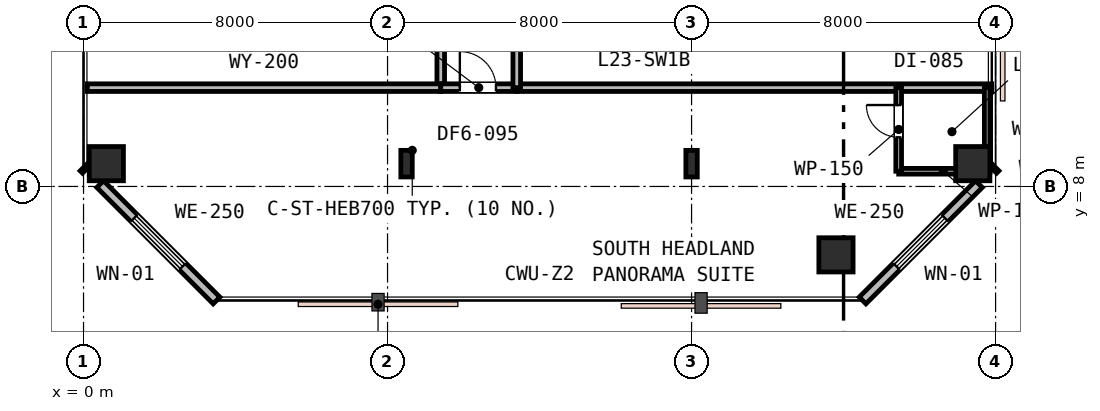
"""IFC4 building model, lengths in metres.
Left out: names, types, materials, properties, quantities, classifications, styles, units other than length and angle.
Written with IfcOpenShell. Run it as: python <this file> out.ifc"""

import sys

from ifc_helpers import new_model, si_unit, direction, frame, frame_2d, origin, origin_2d, place, context, subcontext, project, spatial, rectangle, i_section, extrude, element, fill, save


model = new_model("IFC4")
c1 = context("Model", 3, precision=1e-05, world=origin(), true_north=direction((0.0, 1.0)))
c2 = subcontext(c1, "Body", "Model", "MODEL_VIEW")
j1 = project(units=[si_unit("LENGTHUNIT", "METRE"), si_unit("PLANEANGLEUNIT", "RADIAN")], contexts=[c1])
p1 = place(None, origin())
s1 = spatial("IfcSite", under=j1, at=p1, CompositionType="ELEMENT")
p2 = place(p1, origin())
s2 = spatial("IfcBuilding", under=s1, at=p2, CompositionType="ELEMENT")
p3 = place(p2, frame((0.0, 0.0, 93.6)))
s3 = spatial("IfcBuildingStorey", under=s2, at=p3, CompositionType="ELEMENT", Elevation=93.6)
for number, where, z_axis, x_axis in (
    (1, (0.6, 8.6, 0.0), (0.0, 0.0, 1.0), (1.0, 0.0, 0.0)),
    (2, (19.8, 6.2, 0.0), (0.0, 0.0, 1.0), (1.0, 0.0, 0.0)),
    (3, (23.4, 8.6, 0.0), (0.0, 0.0, 1.0), (1.0, 0.0, 0.0)),
):
    element("IfcColumn", number, at=place(p3, frame(where, z_axis=z_axis, x_axis=x_axis)), inside=s3, PredefinedType="COLUMN", context=c2, shape_type="SweptSolid", body=[
        extrude(rectangle(XDim=0.9, YDim=0.9, at=origin_2d()), origin(), (0.0, 0.0, 1.0), 3.6),
    ])
for number, where, z_axis, x_axis in (
    (4, (8.5, 8.6, 0.0), (0.0, 0.0, 1.0), (1.0, 0.0, 0.0)),
    (5, (16.0, 8.6, 0.0), (0.0, 0.0, 1.0), (1.0, 0.0, 0.0)),
):
    element("IfcColumn", number, at=place(p3, frame(where, z_axis=z_axis, x_axis=x_axis)), inside=s3, PredefinedType="COLUMN", context=c2, shape_type="SweptSolid", body=[
        extrude(i_section(OverallWidth=0.3, OverallDepth=0.7, WebThickness=0.017, FlangeThickness=0.032, FilletRadius=0.027, at=origin_2d()), origin(), (0.0, 0.0, 1.0), 3.6),
    ])
p4 = place(p3, frame((20.5, 5.0, 0.0), z_axis=(0.0, 0.0, 1.0), x_axis=(0.707106781187, 0.707106781187, 0.0)))
e6 = element("IfcWall", 6, at=p4, inside=s3, PredefinedType="STANDARD", context=c2, shape_type="SweptSolid", body=[
    extrude(rectangle(XDim=4.33, YDim=0.25, at=frame_2d((2.165, 0.0))), origin(), (0.0, 0.0, 1.0), 3.33),
])
p5 = place(p4, frame((1.265, 0.0, 0.75)))
e7 = element("IfcOpeningElement", 7, at=p5, cuts=e6, PredefinedType="OPENING", context=c2, shape_type="SweptSolid", body=[
    extrude(rectangle(XDim=1.8, YDim=1.85, at=frame_2d((0.9, 0.925))), frame((0.0, 0.135, 0.0), z_axis=(0.0, -1.0, 0.0), x_axis=(1.0, 0.0, 0.0)), (0.0, 0.0, 1.0), 0.27),
])
for number, where, z_axis, x_axis in (
    (8, (23.938, 8.438, 0.0), (0.0, 0.0, 1.0), (0.707, 0.707, 0.0)),
    (9, (0.0, 8.5, 0.0), (0.0, 0.0, 1.0), (0.707, -0.707, 0.0)),
):
    element("IfcWall", number, at=place(p3, frame(where, z_axis=z_axis, x_axis=x_axis)), inside=s3, PredefinedType="STANDARD", context=c2, shape_type="SweptSolid", body=[
        extrude(rectangle(XDim=0.087, YDim=0.25, at=frame_2d((0.044, 0.0))), origin(), (0.0, 0.0, 1.0), 3.33),
    ])
p6 = place(p3, frame((0.438, 8.062, 0.0), z_axis=(0.0, 0.0, 1.0), x_axis=(0.707106781187, -0.707106781187, 0.0)))
e10 = element("IfcWall", 10, at=p6, inside=s3, PredefinedType="STANDARD", context=c2, shape_type="SweptSolid", body=[
    extrude(rectangle(XDim=4.33, YDim=0.25, at=frame_2d((2.165, 0.0))), origin(), (0.0, 0.0, 1.0), 3.33),
])
p7 = place(p6, frame((1.265, 0.0, 0.75)))
e11 = element("IfcOpeningElement", 11, at=p7, cuts=e10, PredefinedType="OPENING", context=c2, shape_type="SweptSolid", body=[
    extrude(rectangle(XDim=1.8, YDim=1.85, at=frame_2d((0.9, 0.925))), frame((0.0, 0.135, 0.0), z_axis=(0.0, -1.0, 0.0), x_axis=(1.0, 0.0, 0.0)), (0.0, 0.0, 1.0), 0.27),
])
p8 = place(p3, frame((9.4, 10.6, 0.0), z_axis=(0.0, 0.0, 1.0), x_axis=(0.0, 1.0, 0.0)))
e12 = element("IfcWall", 12, at=p8, inside=s3, PredefinedType="PARTITIONING", context=c2, shape_type="SweptSolid", body=[
    extrude(rectangle(XDim=30.9, YDim=0.2, at=frame_2d((15.45, 0.0))), origin(), (0.0, 0.0, 1.0), 2.83),
])
p9 = place(p8, frame((8.679, 0.0, 0.0)))
e13 = element("IfcOpeningElement", 13, at=p9, cuts=e12, PredefinedType="OPENING", context=c2, shape_type="SweptSolid", body=[
    extrude(rectangle(XDim=0.95, YDim=2.15, at=frame_2d((0.475, 1.075))), frame((0.0, 0.11, 0.0), z_axis=(0.0, -1.0, 0.0), x_axis=(1.0, 0.0, 0.0)), (0.0, 0.0, 1.0), 0.22),
])
p10 = place(p8, frame((14.68, 0.0, 0.0)))
e14 = element("IfcOpeningElement", 14, at=p10, cuts=e12, PredefinedType="OPENING", context=c2, shape_type="SweptSolid", body=[
    extrude(rectangle(XDim=0.95, YDim=2.15, at=frame_2d((0.475, 1.075))), frame((0.0, 0.11, 0.0), z_axis=(0.0, -1.0, 0.0), x_axis=(1.0, 0.0, 0.0)), (0.0, 0.0, 1.0), 0.22),
])
p11 = place(p8, frame((4.273, 0.0, 0.0)))
e15 = element("IfcOpeningElement", 15, at=p11, cuts=e12, PredefinedType="OPENING", context=c2, shape_type="SweptSolid", body=[
    extrude(rectangle(XDim=0.95, YDim=2.15, at=frame_2d((0.475, 1.075))), frame((0.0, 0.11, 0.0), z_axis=(0.0, -1.0, 0.0), x_axis=(1.0, 0.0, 0.0)), (0.0, 0.0, 1.0), 0.22),
])
p12 = place(p8, frame((25.745, 0.0, 0.0)))
e16 = element("IfcOpeningElement", 16, at=p12, cuts=e12, PredefinedType="OPENING", context=c2, shape_type="SweptSolid", body=[
    extrude(rectangle(XDim=0.95, YDim=2.15, at=frame_2d((0.475, 1.075))), frame((0.0, 0.11, 0.0), z_axis=(0.0, -1.0, 0.0), x_axis=(1.0, 0.0, 0.0)), (0.0, 0.0, 1.0), 0.22),
])
p13 = place(p3, frame((0.1, 10.6, 0.0), z_axis=(0.0, 0.0, 1.0), x_axis=(1.0, 0.0, 0.0)))
e17 = element("IfcWall", 17, at=p13, inside=s3, PredefinedType="PARTITIONING", context=c2, shape_type="SweptSolid", body=[
    extrude(rectangle(XDim=9.3, YDim=0.2, at=frame_2d((4.65, 0.0))), origin(), (0.0, 0.0, 1.0), 2.83),
])
p14 = place(p3, frame((11.4, 10.6, 0.0), z_axis=(0.0, 0.0, 1.0), x_axis=(1.0, 0.0, 0.0)))
e18 = element("IfcWall", 18, at=p14, inside=s3, PredefinedType="PARTITIONING", context=c2, shape_type="SweptSolid", body=[
    extrude(rectangle(XDim=12.5, YDim=0.2, at=frame_2d((6.25, 0.0))), origin(), (0.0, 0.0, 1.0), 2.83),
])
p15 = place(p3, frame((9.4, 10.6, 0.0), z_axis=(0.0, 0.0, 1.0), x_axis=(1.0, 0.0, 0.0)))
e19 = element("IfcWall", 19, at=p15, inside=s3, PredefinedType="PARTITIONING", context=c2, shape_type="SweptSolid", body=[
    extrude(rectangle(XDim=2.0, YDim=0.2, at=frame_2d((1.0, 0.0))), origin(), (0.0, 0.0, 1.0), 3.02),
])
p16 = place(p15, frame((0.502, 0.0, 0.0)))
e20 = element("IfcOpeningElement", 20, at=p16, cuts=e19, PredefinedType="OPENING", context=c2, shape_type="SweptSolid", body=[
    extrude(rectangle(XDim=0.95, YDim=2.15, at=frame_2d((0.475, 1.075))), frame((0.0, 0.11, 0.0), z_axis=(0.0, -1.0, 0.0), x_axis=(1.0, 0.0, 0.0)), (0.0, 0.0, 1.0), 0.22),
])
p17 = place(p3, frame((21.45, 8.4, 0.0), z_axis=(0.0, 0.0, 1.0), x_axis=(1.0, 0.0, 0.0)))
e21 = element("IfcWall", 21, at=p17, inside=s3, PredefinedType="PARTITIONING", context=c2, shape_type="SweptSolid", body=[
    extrude(rectangle(XDim=2.35, YDim=0.15, at=frame_2d((1.175, 0.0))), origin(), (0.0, 0.0, 1.0), 2.83),
])
p18 = place(p3, frame((21.45, 8.4, 0.0), z_axis=(0.0, 0.0, 1.0), x_axis=(0.0, 1.0, 0.0)))
e22 = element("IfcWall", 22, at=p18, inside=s3, PredefinedType="PARTITIONING", context=c2, shape_type="SweptSolid", body=[
    extrude(rectangle(XDim=2.2, YDim=0.15, at=frame_2d((1.1, 0.0))), origin(), (0.0, 0.0, 1.0), 2.83),
])
p19 = place(p18, frame((0.892, 0.0, 0.0)))
e23 = element("IfcOpeningElement", 23, at=p19, cuts=e22, PredefinedType="OPENING", context=c2, shape_type="SweptSolid", body=[
    extrude(rectangle(XDim=0.85, YDim=2.15, at=frame_2d((0.425, 1.075))), frame((0.0, 0.085, 0.0), z_axis=(0.0, -1.0, 0.0), x_axis=(1.0, 0.0, 0.0)), (0.0, 0.0, 1.0), 0.17),
])
p20 = place(p3, frame((23.78, 10.6, 0.0), z_axis=(0.0, 0.0, 1.0), x_axis=(0.0, -1.0, 0.0)))
e24 = element("IfcWall", 24, at=p20, inside=s3, PredefinedType="PARTITIONING", context=c2, shape_type="SweptSolid", body=[
    extrude(rectangle(XDim=2.22, YDim=0.15, at=frame_2d((1.11, 0.0))), origin(), (0.0, 0.0, 1.0), 2.83),
])
p21 = place(p3, frame((11.4, 10.6, 0.0), z_axis=(0.0, 0.0, 1.0), x_axis=(0.0, 1.0, 0.0)))
e25 = element("IfcWall", 25, at=p21, inside=s3, PredefinedType="PARTITIONING", context=c2, shape_type="SweptSolid", body=[
    extrude(rectangle(XDim=18.0, YDim=0.2, at=frame_2d((9.0, 0.0))), origin(), (0.0, 0.0, 1.0), 2.83),
])
p22 = place(p21, frame((1.29, 0.0, 0.0)))
e26 = element("IfcOpeningElement", 26, at=p22, cuts=e25, PredefinedType="OPENING", context=c2, shape_type="SweptSolid", body=[
    extrude(rectangle(XDim=0.95, YDim=2.15, at=frame_2d((0.475, 1.075))), frame((0.0, 0.11, 0.0), z_axis=(0.0, -1.0, 0.0), x_axis=(1.0, 0.0, 0.0)), (0.0, 0.0, 1.0), 0.22),
])
p23 = place(p21, frame((7.29, 0.0, 0.0)))
e27 = element("IfcOpeningElement", 27, at=p23, cuts=e25, PredefinedType="OPENING", context=c2, shape_type="SweptSolid", body=[
    extrude(rectangle(XDim=0.95, YDim=2.15, at=frame_2d((0.475, 1.075))), frame((0.0, 0.11, 0.0), z_axis=(0.0, -1.0, 0.0), x_axis=(1.0, 0.0, 0.0)), (0.0, 0.0, 1.0), 0.22),
])
p24 = place(p21, frame((13.29, 0.0, 0.0)))
e28 = element("IfcOpeningElement", 28, at=p24, cuts=e25, PredefinedType="OPENING", context=c2, shape_type="SweptSolid", body=[
    extrude(rectangle(XDim=0.95, YDim=2.15, at=frame_2d((0.475, 1.075))), frame((0.0, 0.11, 0.0), z_axis=(0.0, -1.0, 0.0), x_axis=(1.0, 0.0, 0.0)), (0.0, 0.0, 1.0), 0.22),
])
p25 = place(p5, origin())
e29 = element("IfcWindow", 29, at=p25, inside=s3, PartitioningType="SINGLE_PANEL", PredefinedType="WINDOW", context=c2, shape_type="SweptSolid", body=[
    extrude(rectangle(XDim=1.8, YDim=1.85, at=frame_2d((0.9, 0.925))), frame((0.0, 0.03, 0.0), z_axis=(0.0, -1.0, 0.0), x_axis=(1.0, 0.0, 0.0)), (0.0, 0.0, 1.0), 0.06),
])
fill(e7, e29)
p26 = place(p7, origin())
e30 = element("IfcWindow", 30, at=p26, inside=s3, PartitioningType="SINGLE_PANEL", PredefinedType="WINDOW", context=c2, shape_type="SweptSolid", body=[
    extrude(rectangle(XDim=1.8, YDim=1.85, at=frame_2d((0.9, 0.925))), frame((0.0, 0.03, 0.0), z_axis=(0.0, -1.0, 0.0), x_axis=(1.0, 0.0, 0.0)), (0.0, 0.0, 1.0), 0.06),
])
fill(e11, e30)
p27 = place(p16, origin())
e31 = element("IfcDoor", 31, at=p27, inside=s3, OperationType="SINGLE_SWING_LEFT", PredefinedType="DOOR", context=c2, shape_type="SweptSolid", body=[
    extrude(rectangle(XDim=0.95, YDim=2.15, at=frame_2d((0.475, 1.075))), frame((0.0, 0.025, 0.0), z_axis=(0.0, -1.0, 0.0), x_axis=(1.0, 0.0, 0.0)), (0.0, 0.0, 1.0), 0.05),
])
fill(e20, e31)
p28 = place(p19, origin())
e32 = element("IfcDoor", 32, at=p28, inside=s3, OperationType="SINGLE_SWING_RIGHT", PredefinedType="DOOR", context=c2, shape_type="SweptSolid", body=[
    extrude(rectangle(XDim=0.85, YDim=2.15, at=frame_2d((0.425, 1.075))), frame((0.0, 0.025, 0.0), z_axis=(0.0, -1.0, 0.0), x_axis=(1.0, 0.0, 0.0)), (0.0, 0.0, 1.0), 0.05),
])
fill(e23, e32)
save(model, sys.argv[1])
